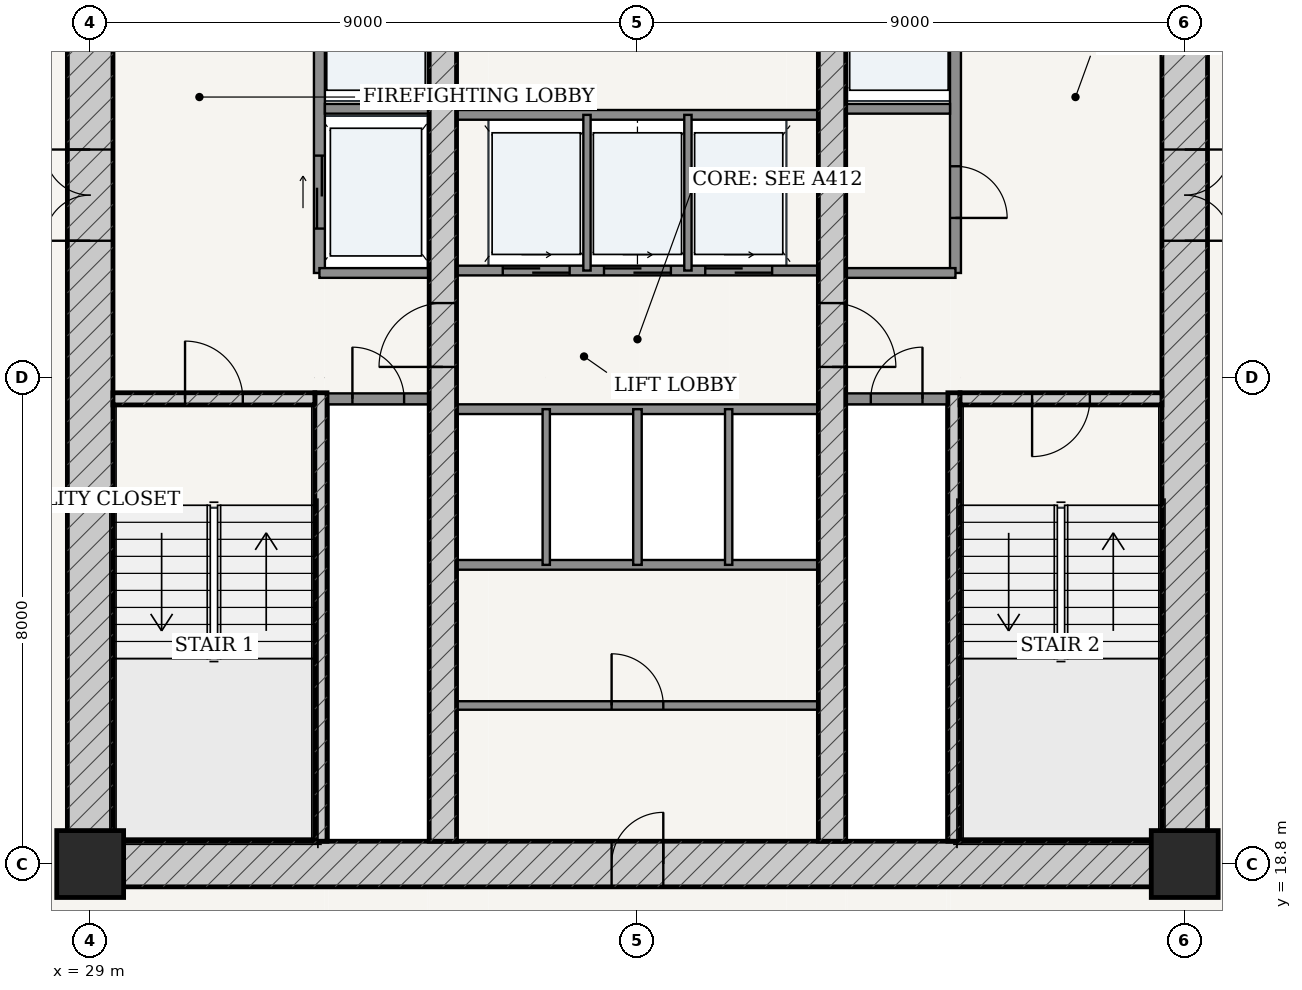
"""IFC4 building model, lengths in metres.
Left out: names, types, materials, properties, quantities, classifications, styles, units other than length and angle.
Written with IfcOpenShell. Run it as: python <this file> out.ifc"""

import sys

from ifc_helpers import new_model, si_unit, direction, frame, frame_2d, origin, origin_2d, place, context, subcontext, project, spatial, rectangle, extrude, source, transform, mapped, element, fill, save


model = new_model("IFC4")
c1 = context("Model", 3, precision=1e-05, world=origin(), true_north=direction((-0.2419218956, 0.970295726276)))
c2 = subcontext(c1, "Body", "Model", "MODEL_VIEW")
j1 = project(units=[si_unit("LENGTHUNIT", "METRE"), si_unit("PLANEANGLEUNIT", "RADIAN")], contexts=[c1])
p1 = place(None, origin())
s1 = spatial("IfcSite", under=j1, at=p1, CompositionType="ELEMENT")
p2 = place(p1, origin())
s2 = spatial("IfcBuilding", under=s1, at=p2, CompositionType="ELEMENT")
p3 = place(p2, frame((0.0, 0.0, 60.0)))
s3 = spatial("IfcBuildingStorey", under=s2, at=p3, CompositionType="ELEMENT", Elevation=60.0)
for number, where, z_axis, x_axis in (
    (1, (29.0, 18.8, 0.0), (0.0, 0.0, 1.0), (1.0, 0.0, 0.0)),
    (2, (47.0, 18.8, 0.0), (0.0, 0.0, 1.0), (1.0, 0.0, 0.0)),
):
    element("IfcColumn", number, at=place(p3, frame(where, z_axis=z_axis, x_axis=x_axis)), inside=s3, PredefinedType="COLUMN", context=c2, shape_type="SweptSolid", body=[
        extrude(rectangle(XDim=1.1, YDim=1.1, at=origin_2d()), origin(), (0.0, 0.0, 1.0), 3.6),
    ])
p4 = place(p3, frame((28.625, 18.8, 0.0), z_axis=(0.0, 0.0, 1.0), x_axis=(1.0, 0.0, 0.0)))
e3 = element("IfcWall", 3, at=p4, inside=s3, PredefinedType="SHEAR", context=c2, shape_type="SweptSolid", body=[
    extrude(rectangle(XDim=18.75, YDim=0.75, at=frame_2d((9.375, 0.0))), origin(), (0.0, 0.0, 1.0), 3.32),
])
p5 = place(p4, frame((8.95, 0.0, 0.0)))
e4 = element("IfcOpeningElement", 4, at=p5, cuts=e3, PredefinedType="OPENING", context=c2, shape_type="SweptSolid", body=[
    extrude(rectangle(XDim=0.85, YDim=2.1, at=frame_2d((0.425, 1.05))), frame((0.0, 0.385, 0.0), z_axis=(0.0, -1.0, 0.0), x_axis=(1.0, 0.0, 0.0)), (0.0, 0.0, 1.0), 0.77),
])
p6 = place(p3, frame((29.0, 19.175, 0.0), z_axis=(0.0, 0.0, 1.0), x_axis=(0.0, 1.0, 0.0)))
e5 = element("IfcWall", 5, at=p6, inside=s3, PredefinedType="SHEAR", context=c2, shape_type="SweptSolid", body=[
    extrude(rectangle(XDim=15.25, YDim=0.75, at=frame_2d((7.625, 0.0))), origin(), (0.0, 0.0, 1.0), 3.32),
])
p7 = place(p6, frame((9.875, 0.0, 0.0)))
e6 = element("IfcOpeningElement", 6, at=p7, cuts=e5, PredefinedType="OPENING", context=c2, shape_type="SweptSolid", body=[
    extrude(rectangle(XDim=1.5, YDim=2.2, at=frame_2d((0.75, 1.1))), frame((0.0, 0.385, 0.0), z_axis=(0.0, -1.0, 0.0), x_axis=(1.0, 0.0, 0.0)), (0.0, 0.0, 1.0), 0.77),
])
p8 = place(p3, frame((47.0, 19.175, 0.0), z_axis=(0.0, 0.0, 1.0), x_axis=(0.0, 1.0, 0.0)))
e7 = element("IfcWall", 7, at=p8, inside=s3, PredefinedType="SHEAR", context=c2, shape_type="SweptSolid", body=[
    extrude(rectangle(XDim=15.25, YDim=0.75, at=frame_2d((7.625, 0.0))), origin(), (0.0, 0.0, 1.0), 3.32),
])
p9 = place(p8, frame((9.875, 0.0, 0.0)))
e8 = element("IfcOpeningElement", 8, at=p9, cuts=e7, PredefinedType="OPENING", context=c2, shape_type="SweptSolid", body=[
    extrude(rectangle(XDim=1.5, YDim=2.2, at=frame_2d((0.75, 1.1))), frame((0.0, 0.385, 0.0), z_axis=(0.0, -1.0, 0.0), x_axis=(1.0, 0.0, 0.0)), (0.0, 0.0, 1.0), 0.77),
])
p10 = place(p3, frame((32.795, 19.175, 0.0), z_axis=(0.0, 0.0, 1.0), x_axis=(0.0, 1.0, 0.0)))
e9 = element("IfcWall", 9, at=p10, inside=s3, PredefinedType="SOLIDWALL", context=c2, shape_type="SweptSolid", body=[
    extrude(rectangle(XDim=7.375, YDim=0.2, at=frame_2d((3.688, 0.0))), origin(), (0.0, 0.0, 1.0), 3.32),
])
p11 = place(p3, frame((29.375, 26.45, 0.0), z_axis=(0.0, 0.0, 1.0), x_axis=(1.0, 0.0, 0.0)))
e10 = element("IfcWall", 10, at=p11, inside=s3, PredefinedType="SOLIDWALL", context=c2, shape_type="SweptSolid", body=[
    extrude(rectangle(XDim=3.32, YDim=0.2, at=frame_2d((1.66, 0.0))), origin(), (0.0, 0.0, 1.0), 3.32),
])
p12 = place(p11, frame((1.185, 0.0, 0.0)))
e11 = element("IfcOpeningElement", 11, at=p12, cuts=e10, PredefinedType="OPENING", context=c2, shape_type="SweptSolid", body=[
    extrude(rectangle(XDim=0.95, YDim=2.15, at=frame_2d((0.475, 1.075))), frame((0.0, 0.11, 0.0), z_axis=(0.0, -1.0, 0.0), x_axis=(1.0, 0.0, 0.0)), (0.0, 0.0, 1.0), 0.22),
])
p13 = place(p3, frame((43.205, 19.175, 0.0), z_axis=(0.0, 0.0, 1.0), x_axis=(0.0, 1.0, 0.0)))
e12 = element("IfcWall", 12, at=p13, inside=s3, PredefinedType="SOLIDWALL", context=c2, shape_type="SweptSolid", body=[
    extrude(rectangle(XDim=7.375, YDim=0.2, at=frame_2d((3.688, 0.0))), origin(), (0.0, 0.0, 1.0), 3.32),
])
p14 = place(p3, frame((43.305, 26.45, 0.0), z_axis=(0.0, 0.0, 1.0), x_axis=(1.0, 0.0, 0.0)))
e13 = element("IfcWall", 13, at=p14, inside=s3, PredefinedType="SOLIDWALL", context=c2, shape_type="SweptSolid", body=[
    extrude(rectangle(XDim=3.32, YDim=0.2, at=frame_2d((1.66, 0.0))), origin(), (0.0, 0.0, 1.0), 3.32),
])
p15 = place(p14, frame((1.185, 0.0, 0.0)))
e14 = element("IfcOpeningElement", 14, at=p15, cuts=e13, PredefinedType="OPENING", context=c2, shape_type="SweptSolid", body=[
    extrude(rectangle(XDim=0.95, YDim=2.15, at=frame_2d((0.475, 1.075))), frame((0.0, 0.11, 0.0), z_axis=(0.0, -1.0, 0.0), x_axis=(1.0, 0.0, 0.0)), (0.0, 0.0, 1.0), 0.22),
])
p16 = place(p3, frame((34.8, 19.175, 0.0), z_axis=(0.0, 0.0, 1.0), x_axis=(0.0, 1.0, 0.0)))
e15 = element("IfcWall", 15, at=p16, inside=s3, PredefinedType="SHEAR", context=c2, shape_type="SweptSolid", body=[
    extrude(rectangle(XDim=15.25, YDim=0.45, at=frame_2d((7.625, 0.0))), origin(), (0.0, 0.0, 1.0), 3.32),
])
p17 = place(p16, frame((7.8, 0.0, 0.0)))
e16 = element("IfcOpeningElement", 16, at=p17, cuts=e15, PredefinedType="OPENING", context=c2, shape_type="SweptSolid", body=[
    extrude(rectangle(XDim=1.05, YDim=2.15, at=frame_2d((0.525, 1.075))), frame((0.0, 0.235, 0.0), z_axis=(0.0, -1.0, 0.0), x_axis=(1.0, 0.0, 0.0)), (0.0, 0.0, 1.0), 0.47),
])
p18 = place(p3, frame((41.2, 19.175, 0.0), z_axis=(0.0, 0.0, 1.0), x_axis=(0.0, 1.0, 0.0)))
e17 = element("IfcWall", 17, at=p18, inside=s3, PredefinedType="SHEAR", context=c2, shape_type="SweptSolid", body=[
    extrude(rectangle(XDim=15.25, YDim=0.45, at=frame_2d((7.625, 0.0))), origin(), (0.0, 0.0, 1.0), 3.32),
])
p19 = place(p18, frame((7.8, 0.0, 0.0)))
e18 = element("IfcOpeningElement", 18, at=p19, cuts=e17, PredefinedType="OPENING", context=c2, shape_type="SweptSolid", body=[
    extrude(rectangle(XDim=1.05, YDim=2.15, at=frame_2d((0.525, 1.075))), frame((0.0, 0.235, 0.0), z_axis=(0.0, -1.0, 0.0), x_axis=(1.0, 0.0, 0.0)), (0.0, 0.0, 1.0), 0.47),
])
p20 = place(p3, frame((32.9, 26.45, 0.0), z_axis=(0.0, 0.0, 1.0), x_axis=(1.0, 0.0, 0.0)))
e19 = element("IfcWall", 19, at=p20, inside=s3, PredefinedType="PARTITIONING", context=c2, shape_type="SweptSolid", body=[
    extrude(rectangle(XDim=1.675, YDim=0.18, at=frame_2d((0.837, 0.0))), origin(), (0.0, 0.0, 1.0), 3.32),
])
p21 = place(p20, frame((0.413, 0.0, 0.0)))
e20 = element("IfcOpeningElement", 20, at=p21, cuts=e19, PredefinedType="OPENING", context=c2, shape_type="SweptSolid", body=[
    extrude(rectangle(XDim=0.85, YDim=2.1, at=frame_2d((0.425, 1.05))), frame((0.0, 0.1, 0.0), z_axis=(0.0, -1.0, 0.0), x_axis=(1.0, 0.0, 0.0)), (0.0, 0.0, 1.0), 0.2),
])
p22 = place(p3, frame((41.425, 26.45, 0.0), z_axis=(0.0, 0.0, 1.0), x_axis=(1.0, 0.0, 0.0)))
e21 = element("IfcWall", 21, at=p22, inside=s3, PredefinedType="PARTITIONING", context=c2, shape_type="SweptSolid", body=[
    extrude(rectangle(XDim=1.675, YDim=0.18, at=frame_2d((0.837, 0.0))), origin(), (0.0, 0.0, 1.0), 3.32),
])
p23 = place(p22, frame((0.413, 0.0, 0.0)))
e22 = element("IfcOpeningElement", 22, at=p23, cuts=e21, PredefinedType="OPENING", context=c2, shape_type="SweptSolid", body=[
    extrude(rectangle(XDim=0.85, YDim=2.1, at=frame_2d((0.425, 1.05))), frame((0.0, 0.1, 0.0), z_axis=(0.0, -1.0, 0.0), x_axis=(1.0, 0.0, 0.0)), (0.0, 0.0, 1.0), 0.2),
])
p24 = place(p3, frame((32.77, 28.52, 0.0), z_axis=(0.0, 0.0, 1.0), x_axis=(0.0, 1.0, 0.0)))
e23 = element("IfcWall", 23, at=p24, inside=s3, PredefinedType="PARTITIONING", context=c2, shape_type="SweptSolid", body=[
    extrude(rectangle(XDim=5.905, YDim=0.18, at=frame_2d((2.953, 0.0))), origin(), (0.0, 0.0, 1.0), 3.32),
])
p25 = place(p24, frame((3.655, 0.0, 0.0)))
e24 = element("IfcOpeningElement", 24, at=p25, cuts=e23, PredefinedType="OPENING", context=c2, shape_type="SweptSolid", body=[
    extrude(rectangle(XDim=1.15, YDim=2.2, at=frame_2d((0.575, 1.1))), frame((0.0, 0.1, 0.0), z_axis=(0.0, -1.0, 0.0), x_axis=(1.0, 0.0, 0.0)), (0.0, 0.0, 1.0), 0.2),
])
p26 = place(p24, frame((0.73, 0.0, 0.0)))
e25 = element("IfcOpeningElement", 25, at=p26, cuts=e23, PredefinedType="OPENING", context=c2, shape_type="SweptSolid", body=[
    extrude(rectangle(XDim=1.2, YDim=2.25, at=frame_2d((0.6, 1.125))), frame((0.0, 0.1, 0.0), z_axis=(0.0, -1.0, 0.0), x_axis=(1.0, 0.0, 0.0)), (0.0, 0.0, 1.0), 0.2),
])
p27 = place(p3, frame((32.86, 31.22, 0.0), z_axis=(0.0, 0.0, 1.0), x_axis=(1.0, 0.0, 0.0)))
e26 = element("IfcWall", 26, at=p27, inside=s3, PredefinedType="PARTITIONING", context=c2, shape_type="SweptSolid", body=[
    extrude(rectangle(XDim=1.715, YDim=0.16, at=frame_2d((0.857, 0.0))), origin(), (0.0, 0.0, 1.0), 3.32),
])
p28 = place(p3, frame((32.77, 28.52, 0.0), z_axis=(0.0, 0.0, 1.0), x_axis=(1.0, 0.0, 0.0)))
e27 = element("IfcWall", 27, at=p28, inside=s3, PredefinedType="PARTITIONING", context=c2, shape_type="SweptSolid", body=[
    extrude(rectangle(XDim=1.805, YDim=0.16, at=frame_2d((0.902, 0.0))), origin(), (0.0, 0.0, 1.0), 3.32),
])
p29 = place(p3, frame((43.23, 28.52, 0.0), z_axis=(0.0, 0.0, 1.0), x_axis=(0.0, 1.0, 0.0)))
e28 = element("IfcWall", 28, at=p29, inside=s3, PredefinedType="PARTITIONING", context=c2, shape_type="SweptSolid", body=[
    extrude(rectangle(XDim=5.905, YDim=0.18, at=frame_2d((2.953, 0.0))), origin(), (0.0, 0.0, 1.0), 3.32),
])
p30 = place(p29, frame((0.905, 0.0, 0.0)))
e29 = element("IfcOpeningElement", 29, at=p30, cuts=e28, PredefinedType="OPENING", context=c2, shape_type="SweptSolid", body=[
    extrude(rectangle(XDim=0.85, YDim=2.1, at=frame_2d((0.425, 1.05))), frame((0.0, 0.1, 0.0), z_axis=(0.0, -1.0, 0.0), x_axis=(1.0, 0.0, 0.0)), (0.0, 0.0, 1.0), 0.2),
])
p31 = place(p29, frame((3.655, 0.0, 0.0)))
e30 = element("IfcOpeningElement", 30, at=p31, cuts=e28, PredefinedType="OPENING", context=c2, shape_type="SweptSolid", body=[
    extrude(rectangle(XDim=1.15, YDim=2.2, at=frame_2d((0.575, 1.1))), frame((0.0, 0.1, 0.0), z_axis=(0.0, -1.0, 0.0), x_axis=(1.0, 0.0, 0.0)), (0.0, 0.0, 1.0), 0.2),
])
p32 = place(p3, frame((41.425, 31.22, 0.0), z_axis=(0.0, 0.0, 1.0), x_axis=(1.0, 0.0, 0.0)))
e31 = element("IfcWall", 31, at=p32, inside=s3, PredefinedType="PARTITIONING", context=c2, shape_type="SweptSolid", body=[
    extrude(rectangle(XDim=1.715, YDim=0.16, at=frame_2d((0.857, 0.0))), origin(), (0.0, 0.0, 1.0), 3.32),
])
p33 = place(p3, frame((41.425, 28.52, 0.0), z_axis=(0.0, 0.0, 1.0), x_axis=(1.0, 0.0, 0.0)))
e32 = element("IfcWall", 32, at=p33, inside=s3, PredefinedType="PARTITIONING", context=c2, shape_type="SweptSolid", body=[
    extrude(rectangle(XDim=1.805, YDim=0.16, at=frame_2d((0.902, 0.0))), origin(), (0.0, 0.0, 1.0), 3.32),
])
p34 = place(p3, frame((35.025, 28.56, 0.0), z_axis=(0.0, 0.0, 1.0), x_axis=(1.0, 0.0, 0.0)))
e33 = element("IfcWall", 33, at=p34, inside=s3, PredefinedType="PARTITIONING", context=c2, shape_type="SweptSolid", body=[
    extrude(rectangle(XDim=5.95, YDim=0.16, at=frame_2d((2.975, 0.0))), origin(), (0.0, 0.0, 1.0), 3.32),
])
p35 = place(p34, frame((0.76, 0.0, 0.0)))
e34 = element("IfcOpeningElement", 34, at=p35, cuts=e33, PredefinedType="OPENING", context=c2, shape_type="SweptSolid", body=[
    extrude(rectangle(XDim=1.1, YDim=2.2, at=frame_2d((0.55, 1.1))), frame((0.0, 0.09, 0.0), z_axis=(0.0, -1.0, 0.0), x_axis=(1.0, 0.0, 0.0)), (0.0, 0.0, 1.0), 0.18),
])
p36 = place(p34, frame((2.425, 0.0, 0.0)))
e35 = element("IfcOpeningElement", 35, at=p36, cuts=e33, PredefinedType="OPENING", context=c2, shape_type="SweptSolid", body=[
    extrude(rectangle(XDim=1.1, YDim=2.2, at=frame_2d((0.55, 1.1))), frame((0.0, 0.09, 0.0), z_axis=(0.0, -1.0, 0.0), x_axis=(1.0, 0.0, 0.0)), (0.0, 0.0, 1.0), 0.18),
])
p37 = place(p34, frame((4.09, 0.0, 0.0)))
e36 = element("IfcOpeningElement", 36, at=p37, cuts=e33, PredefinedType="OPENING", context=c2, shape_type="SweptSolid", body=[
    extrude(rectangle(XDim=1.1, YDim=2.2, at=frame_2d((0.55, 1.1))), frame((0.0, 0.09, 0.0), z_axis=(0.0, -1.0, 0.0), x_axis=(1.0, 0.0, 0.0)), (0.0, 0.0, 1.0), 0.18),
])
p38 = place(p3, frame((35.025, 31.12, 0.0), z_axis=(0.0, 0.0, 1.0), x_axis=(1.0, 0.0, 0.0)))
e37 = element("IfcWall", 37, at=p38, inside=s3, PredefinedType="PARTITIONING", context=c2, shape_type="SweptSolid", body=[
    extrude(rectangle(XDim=5.95, YDim=0.16, at=frame_2d((2.975, 0.0))), origin(), (0.0, 0.0, 1.0), 3.32),
])
for number, where, z_axis, x_axis in (
    (38, (37.17, 28.56, 0.0), (0.0, 0.0, 1.0), (0.0, 1.0, 0.0)),
    (39, (38.83, 28.56, 0.0), (0.0, 0.0, 1.0), (0.0, 1.0, 0.0)),
):
    element("IfcWall", number, at=place(p3, frame(where, z_axis=z_axis, x_axis=x_axis)), inside=s3, PredefinedType="PARTITIONING", context=c2, shape_type="SweptSolid", body=[
        extrude(rectangle(XDim=2.56, YDim=0.12, at=frame_2d((1.28, 0.0))), origin(), (0.0, 0.0, 1.0), 3.32),
    ])
for number, where, z_axis, x_axis in (
    (40, (35.025, 26.28, 0.0), (0.0, 0.0, 1.0), (1.0, 0.0, 0.0)),
    (41, (35.025, 23.72, 0.0), (0.0, 0.0, 1.0), (1.0, 0.0, 0.0)),
):
    element("IfcWall", number, at=place(p3, frame(where, z_axis=z_axis, x_axis=x_axis)), inside=s3, PredefinedType="PARTITIONING", context=c2, shape_type="SweptSolid", body=[
        extrude(rectangle(XDim=5.95, YDim=0.16, at=frame_2d((2.975, 0.0))), origin(), (0.0, 0.0, 1.0), 3.32),
    ])
p39 = place(p3, frame((36.5, 23.72, 0.0), z_axis=(0.0, 0.0, 1.0), x_axis=(0.0, 1.0, 0.0)))
e42 = element("IfcWall", 42, at=p39, inside=s3, PredefinedType="PARTITIONING", context=c2, shape_type="SweptSolid", body=[
    extrude(rectangle(XDim=2.56, YDim=0.12, at=frame_2d((1.28, 0.0))), origin(), (0.0, 0.0, 1.0), 3.32),
])
p40 = place(p3, frame((38.0, 23.72, 0.0), z_axis=(0.0, 0.0, 1.0), x_axis=(0.0, 1.0, 0.0)))
e43 = element("IfcWall", 43, at=p40, inside=s3, PredefinedType="PARTITIONING", context=c2, shape_type="SweptSolid", body=[
    extrude(rectangle(XDim=2.56, YDim=0.14, at=frame_2d((1.28, 0.0))), origin(), (0.0, 0.0, 1.0), 3.32),
])
p41 = place(p3, frame((39.5, 23.72, 0.0), z_axis=(0.0, 0.0, 1.0), x_axis=(0.0, 1.0, 0.0)))
e44 = element("IfcWall", 44, at=p41, inside=s3, PredefinedType="PARTITIONING", context=c2, shape_type="SweptSolid", body=[
    extrude(rectangle(XDim=2.56, YDim=0.12, at=frame_2d((1.28, 0.0))), origin(), (0.0, 0.0, 1.0), 3.32),
])
p42 = place(p3, frame((35.025, 21.407, 0.0), z_axis=(0.0, 0.0, 1.0), x_axis=(1.0, 0.0, 0.0)))
e45 = element("IfcWall", 45, at=p42, inside=s3, PredefinedType="PARTITIONING", context=c2, shape_type="SweptSolid", body=[
    extrude(rectangle(XDim=5.95, YDim=0.14, at=frame_2d((2.975, 0.0))), origin(), (0.0, 0.0, 1.0), 3.32),
])
p43 = place(p42, frame((2.55, 0.0, 0.0)))
e46 = element("IfcOpeningElement", 46, at=p43, cuts=e45, PredefinedType="OPENING", context=c2, shape_type="SweptSolid", body=[
    extrude(rectangle(XDim=0.85, YDim=2.1, at=frame_2d((0.425, 1.05))), frame((0.0, 0.08, 0.0), z_axis=(0.0, -1.0, 0.0), x_axis=(1.0, 0.0, 0.0)), (0.0, 0.0, 1.0), 0.16),
])
m1 = source(origin(), c2, "Body", "SweptSolid", [
    extrude(rectangle(XDim=1.5, YDim=2.2, at=frame_2d((0.75, 1.1))), frame((0.0, 0.025, 0.0), z_axis=(0.0, -1.0, 0.0), x_axis=(1.0, 0.0, 0.0)), (0.0, 0.0, 1.0), 0.05),
])
p44 = place(p7, origin())
e47 = element("IfcDoor", 47, at=p44, inside=s3, OperationType="DOUBLE_DOOR_SINGLE_SWING", PredefinedType="DOOR", context=c2, shape_type="MappedRepresentation", body=[
    mapped(m1, transform((0.0, 0.0, 0.0), scale=1.0)),
])
fill(e6, e47)
p45 = place(p9, frame((1.5, 0.0, 0.0), z_axis=(0.0, 0.0, 1.0), x_axis=(-1.0, 0.0, 0.0)))
e48 = element("IfcDoor", 48, at=p45, inside=s3, OperationType="DOUBLE_DOOR_SINGLE_SWING", PredefinedType="DOOR", context=c2, shape_type="MappedRepresentation", body=[
    mapped(m1, transform((0.0, 0.0, 0.0), scale=1.0)),
])
fill(e8, e48)
m2 = source(origin(), c2, "Body", "SweptSolid", [
    extrude(rectangle(XDim=1.05, YDim=2.15, at=frame_2d((0.525, 1.075))), frame((0.0, 0.025, 0.0), z_axis=(0.0, -1.0, 0.0), x_axis=(1.0, 0.0, 0.0)), (0.0, 0.0, 1.0), 0.05),
])
p46 = place(p17, origin())
e49 = element("IfcDoor", 49, at=p46, inside=s3, OperationType="SINGLE_SWING_LEFT", PredefinedType="DOOR", context=c2, shape_type="MappedRepresentation", body=[
    mapped(m2, transform((0.0, 0.0, 0.0), scale=1.0)),
])
fill(e16, e49)
p47 = place(p19, frame((1.05, 0.0, 0.0), z_axis=(0.0, 0.0, 1.0), x_axis=(-1.0, 0.0, 0.0)))
e50 = element("IfcDoor", 50, at=p47, inside=s3, OperationType="SINGLE_SWING_RIGHT", PredefinedType="DOOR", context=c2, shape_type="MappedRepresentation", body=[
    mapped(m2, transform((0.0, 0.0, 0.0), scale=1.0)),
])
fill(e18, e50)
m3 = source(origin(), c2, "Body", "SweptSolid", [
    extrude(rectangle(XDim=0.95, YDim=2.15, at=frame_2d((0.475, 1.075))), frame((0.0, 0.025, 0.0), z_axis=(0.0, -1.0, 0.0), x_axis=(1.0, 0.0, 0.0)), (0.0, 0.0, 1.0), 0.05),
])
p48 = place(p12, origin())
e51 = element("IfcDoor", 51, at=p48, inside=s3, OperationType="SINGLE_SWING_LEFT", PredefinedType="DOOR", context=c2, shape_type="MappedRepresentation", body=[
    mapped(m3, transform((0.0, 0.0, 0.0), scale=1.0)),
])
fill(e11, e51)
p49 = place(p15, frame((0.95, 0.0, 0.0), z_axis=(0.0, 0.0, 1.0), x_axis=(-1.0, 0.0, 0.0)))
e52 = element("IfcDoor", 52, at=p49, inside=s3, OperationType="SINGLE_SWING_RIGHT", PredefinedType="DOOR", context=c2, shape_type="MappedRepresentation", body=[
    mapped(m3, transform((0.0, 0.0, 0.0), scale=1.0)),
])
fill(e14, e52)
m4 = source(origin(), c2, "Body", "SweptSolid", [
    extrude(rectangle(XDim=0.85, YDim=2.1, at=frame_2d((0.425, 1.05))), frame((0.0, 0.025, 0.0), z_axis=(0.0, -1.0, 0.0), x_axis=(1.0, 0.0, 0.0)), (0.0, 0.0, 1.0), 0.05),
])
p50 = place(p21, origin())
e53 = element("IfcDoor", 53, at=p50, inside=s3, OperationType="SINGLE_SWING_LEFT", PredefinedType="DOOR", context=c2, shape_type="MappedRepresentation", body=[
    mapped(m4, transform((0.0, 0.0, 0.0), scale=1.0)),
])
fill(e20, e53)
p51 = place(p23, origin())
e54 = element("IfcDoor", 54, at=p51, inside=s3, OperationType="SINGLE_SWING_RIGHT", PredefinedType="DOOR", context=c2, shape_type="MappedRepresentation", body=[
    mapped(m4, transform((0.0, 0.0, 0.0), scale=1.0)),
])
fill(e22, e54)
p52 = place(p30, frame((0.85, 0.0, 0.0), z_axis=(0.0, 0.0, 1.0), x_axis=(-1.0, 0.0, 0.0)))
e55 = element("IfcDoor", 55, at=p52, inside=s3, OperationType="SINGLE_SWING_RIGHT", PredefinedType="DOOR", context=c2, shape_type="MappedRepresentation", body=[
    mapped(m4, transform((0.0, 0.0, 0.0), scale=1.0)),
])
fill(e29, e55)
p53 = place(p5, origin())
e56 = element("IfcDoor", 56, at=p53, inside=s3, OperationType="SINGLE_SWING_RIGHT", PredefinedType="DOOR", context=c2, shape_type="MappedRepresentation", body=[
    mapped(m4, transform((0.0, 0.0, 0.0), scale=1.0)),
])
fill(e4, e56)
p54 = place(p43, origin())
e57 = element("IfcDoor", 57, at=p54, inside=s3, OperationType="SINGLE_SWING_LEFT", PredefinedType="DOOR", context=c2, shape_type="MappedRepresentation", body=[
    mapped(m4, transform((0.0, 0.0, 0.0), scale=1.0)),
])
fill(e46, e57)
m5 = source(origin(), c2, "Body", "SweptSolid", [
    extrude(rectangle(XDim=1.2, YDim=2.25, at=frame_2d((0.6, 1.125))), frame((0.0, 0.025, 0.0), z_axis=(0.0, -1.0, 0.0), x_axis=(1.0, 0.0, 0.0)), (0.0, 0.0, 1.0), 0.05),
])
p55 = place(p26, origin())
e58 = element("IfcDoor", 58, at=p55, inside=s3, OperationType="DOUBLE_DOOR_SLIDING", PredefinedType="DOOR", context=c2, shape_type="MappedRepresentation", body=[
    mapped(m5, transform((0.0, 0.0, 0.0), scale=1.0)),
])
fill(e25, e58)
m6 = source(origin(), c2, "Body", "SweptSolid", [
    extrude(rectangle(XDim=1.1, YDim=2.2, at=frame_2d((0.55, 1.1))), frame((0.0, 0.025, 0.0), z_axis=(0.0, -1.0, 0.0), x_axis=(1.0, 0.0, 0.0)), (0.0, 0.0, 1.0), 0.05),
])
p56 = place(p35, origin())
e59 = element("IfcDoor", 59, at=p56, inside=s3, OperationType="DOUBLE_DOOR_SLIDING", PredefinedType="DOOR", context=c2, shape_type="MappedRepresentation", body=[
    mapped(m6, transform((0.0, 0.0, 0.0), scale=1.0)),
])
fill(e34, e59)
p57 = place(p36, origin())
e60 = element("IfcDoor", 60, at=p57, inside=s3, OperationType="DOUBLE_DOOR_SLIDING", PredefinedType="DOOR", context=c2, shape_type="MappedRepresentation", body=[
    mapped(m6, transform((0.0, 0.0, 0.0), scale=1.0)),
])
fill(e35, e60)
p58 = place(p37, origin())
e61 = element("IfcDoor", 61, at=p58, inside=s3, OperationType="DOUBLE_DOOR_SLIDING", PredefinedType="DOOR", context=c2, shape_type="MappedRepresentation", body=[
    mapped(m6, transform((0.0, 0.0, 0.0), scale=1.0)),
])
fill(e36, e61)
save(model, sys.argv[1])
